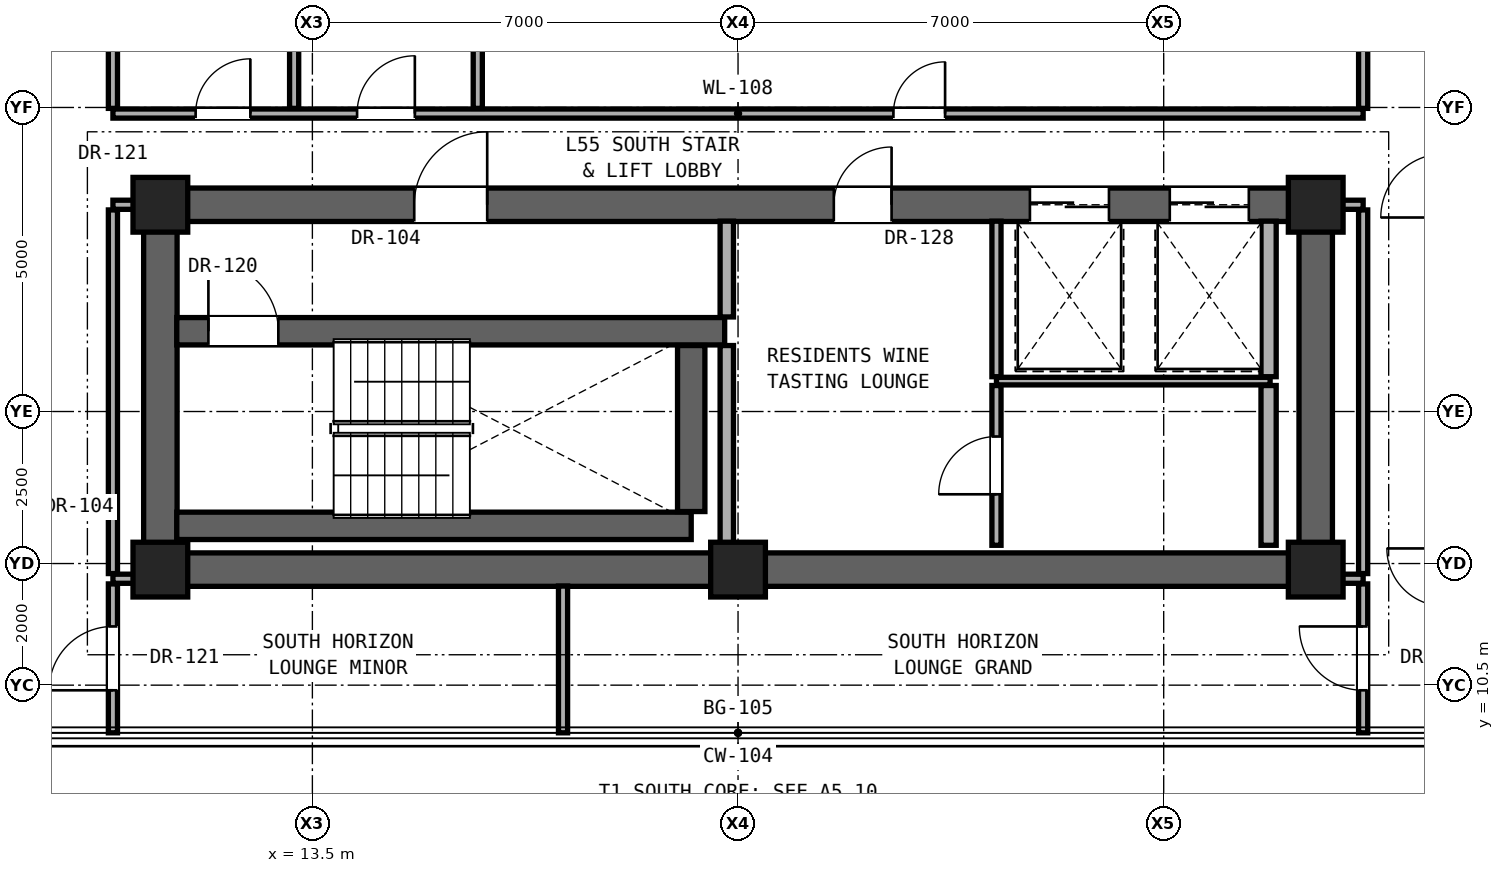
"""IFC4 building model, lengths in metres.
Left out: names, types, materials, properties, quantities, classifications, styles, units other than length and angle.
Written with IfcOpenShell. Run it as: python <this file> out.ifc"""

import sys

from ifc_helpers import new_model, si_unit, direction, frame, frame_2d, origin, origin_2d, place, context, subcontext, project, spatial, rectangle, extrude, element, fill, save


model = new_model("IFC4")
c1 = context("Model", 3, precision=1e-05, world=origin(), true_north=direction((0.0, 1.0)))
c2 = subcontext(c1, "Body", "Model", "MODEL_VIEW")
j1 = project(units=[si_unit("LENGTHUNIT", "METRE"), si_unit("PLANEANGLEUNIT", "RADIAN")], contexts=[c1])
p1 = place(None, origin())
s1 = spatial("IfcSite", under=j1, at=p1, CompositionType="ELEMENT")
p2 = place(p1, origin())
s2 = spatial("IfcBuilding", under=s1, at=p2, CompositionType="ELEMENT")
p3 = place(p2, frame((0.0, 0.0, 193.4)))
s3 = spatial("IfcBuildingStorey", under=s2, at=p3, CompositionType="ELEMENT", Elevation=193.4)
for number, where, z_axis, x_axis in (
    (1, (11.0, 12.4, 0.0), (0.0, 0.0, 1.0), (1.0, 0.0, 0.0)),
    (2, (20.5, 12.4, 0.0), (0.0, 0.0, 1.0), (1.0, 0.0, 0.0)),
    (3, (30.0, 12.4, 0.0), (0.0, 0.0, 1.0), (1.0, 0.0, 0.0)),
    (4, (11.0, 18.4, 0.0), (0.0, 0.0, 1.0), (1.0, 0.0, 0.0)),
    (5, (30.0, 18.4, 0.0), (0.0, 0.0, 1.0), (1.0, 0.0, 0.0)),
):
    element("IfcColumn", number, at=place(p3, frame(where, z_axis=z_axis, x_axis=x_axis)), inside=s3, PredefinedType="COLUMN", context=c2, shape_type="SweptSolid", body=[
        extrude(rectangle(XDim=0.9, YDim=0.9, at=origin_2d()), origin(), (0.0, 0.0, 1.0), 3.25),
    ])
p4 = place(p3, frame((11.0, 12.4, 0.0), z_axis=(0.0, 0.0, 1.0), x_axis=(1.0, 0.0, 0.0)))
e6 = element("IfcWall", 6, at=p4, inside=s3, PredefinedType="SHEAR", context=c2, shape_type="SweptSolid", body=[
    extrude(rectangle(XDim=19.0, YDim=0.55, at=frame_2d((9.5, 0.0))), origin(), (0.0, 0.0, 1.0), 3.05),
])
for number, where, z_axis, x_axis in (
    (7, (11.0, 12.4, 0.0), (0.0, 0.0, 1.0), (0.0, 1.0, 0.0)),
    (8, (30.0, 12.4, 0.0), (0.0, 0.0, 1.0), (0.0, 1.0, 0.0)),
):
    element("IfcWall", number, at=place(p3, frame(where, z_axis=z_axis, x_axis=x_axis)), inside=s3, PredefinedType="SHEAR", context=c2, shape_type="SweptSolid", body=[
        extrude(rectangle(XDim=6.0, YDim=0.55, at=frame_2d((3.0, 0.0))), origin(), (0.0, 0.0, 1.0), 3.05),
    ])
p5 = place(p3, frame((11.0, 18.4, 0.0), z_axis=(0.0, 0.0, 1.0), x_axis=(1.0, 0.0, 0.0)))
e9 = element("IfcWall", 9, at=p5, inside=s3, PredefinedType="SHEAR", context=c2, shape_type="SweptSolid", body=[
    extrude(rectangle(XDim=19.0, YDim=0.55, at=frame_2d((9.5, 0.0))), origin(), (0.0, 0.0, 1.0), 3.05),
])
p6 = place(p5, frame((4.175, 0.0, 0.0)))
e10 = element("IfcOpeningElement", 10, at=p6, cuts=e9, PredefinedType="OPENING", context=c2, shape_type="SweptSolid", body=[
    extrude(rectangle(XDim=1.2, YDim=2.25, at=frame_2d((0.6, 1.125))), frame((0.0, 0.285, 0.0), z_axis=(0.0, -1.0, 0.0), x_axis=(1.0, 0.0, 0.0)), (0.0, 0.0, 1.0), 0.57),
])
p7 = place(p5, frame((11.075, 0.0, 0.0)))
e11 = element("IfcOpeningElement", 11, at=p7, cuts=e9, PredefinedType="OPENING", context=c2, shape_type="SweptSolid", body=[
    extrude(rectangle(XDim=0.95, YDim=2.15, at=frame_2d((0.475, 1.075))), frame((0.0, 0.285, 0.0), z_axis=(0.0, -1.0, 0.0), x_axis=(1.0, 0.0, 0.0)), (0.0, 0.0, 1.0), 0.57),
])
p8 = place(p5, frame((14.3, 0.0, 0.0)))
e12 = element("IfcOpeningElement", 12, at=p8, cuts=e9, PredefinedType="OPENING", context=c2, shape_type="SweptSolid", body=[
    extrude(rectangle(XDim=1.3, YDim=2.3, at=frame_2d((0.65, 1.15))), frame((0.0, 0.285, 0.0), z_axis=(0.0, -1.0, 0.0), x_axis=(1.0, 0.0, 0.0)), (0.0, 0.0, 1.0), 0.57),
])
p9 = place(p5, frame((16.6, 0.0, 0.0)))
e13 = element("IfcOpeningElement", 13, at=p9, cuts=e9, PredefinedType="OPENING", context=c2, shape_type="SweptSolid", body=[
    extrude(rectangle(XDim=1.3, YDim=2.3, at=frame_2d((0.65, 1.15))), frame((0.0, 0.285, 0.0), z_axis=(0.0, -1.0, 0.0), x_axis=(1.0, 0.0, 0.0)), (0.0, 0.0, 1.0), 0.57),
])
for number, where, z_axis, x_axis in (
    (14, (10.22, 12.25, 0.0), (0.0, 0.0, 1.0), (1.0, 0.0, 0.0)),
    (15, (30.27, 12.25, 0.0), (0.0, 0.0, 1.0), (1.0, 0.0, 0.0)),
):
    element("IfcWall", number, at=place(p3, frame(where, z_axis=z_axis, x_axis=x_axis)), inside=s3, PredefinedType="PARTITIONING", context=c2, shape_type="SweptSolid", body=[
        extrude(rectangle(XDim=0.51, YDim=0.15, at=frame_2d((0.255, 0.0))), origin(), (0.0, 0.0, 1.0), 3.05),
    ])
p10 = place(p3, frame((11.27, 13.12, 0.0), z_axis=(0.0, 0.0, 1.0), x_axis=(1.0, 0.0, 0.0)))
e16 = element("IfcWall", 16, at=p10, inside=s3, PredefinedType="SHEAR", context=c2, shape_type="SweptSolid", body=[
    extrude(rectangle(XDim=8.46, YDim=0.45, at=frame_2d((4.23, 0.0))), origin(), (0.0, 0.0, 1.0), 3.05),
])
p11 = place(p3, frame((24.75, 15.5, 0.0), z_axis=(0.0, 0.0, 1.0), x_axis=(1.0, 0.0, 0.0)))
e17 = element("IfcWall", 17, at=p11, inside=s3, PredefinedType="PARTITIONING", context=c2, shape_type="SweptSolid", body=[
    extrude(rectangle(XDim=4.5, YDim=0.125, at=frame_2d((2.25, 0.0))), origin(), (0.0, 0.0, 1.0), 3.05),
])
p12 = place(p3, frame((11.27, 16.32, 0.0), z_axis=(0.0, 0.0, 1.0), x_axis=(1.0, 0.0, 0.0)))
e18 = element("IfcWall", 18, at=p12, inside=s3, PredefinedType="SHEAR", context=c2, shape_type="SweptSolid", body=[
    extrude(rectangle(XDim=9.01, YDim=0.45, at=frame_2d((4.505, 0.0))), origin(), (0.0, 0.0, 1.0), 3.05),
])
p13 = place(p12, frame((0.52, 0.0, 0.0)))
e19 = element("IfcOpeningElement", 19, at=p13, cuts=e18, PredefinedType="OPENING", context=c2, shape_type="SweptSolid", body=[
    extrude(rectangle(XDim=1.15, YDim=2.2, at=frame_2d((0.575, 1.1))), frame((0.0, 0.235, 0.0), z_axis=(0.0, -1.0, 0.0), x_axis=(1.0, 0.0, 0.0)), (0.0, 0.0, 1.0), 0.47),
])
for number, where, z_axis, x_axis in (
    (20, (10.22, 18.4, 0.0), (0.0, 0.0, 1.0), (1.0, 0.0, 0.0)),
    (21, (30.27, 18.4, 0.0), (0.0, 0.0, 1.0), (1.0, 0.0, 0.0)),
):
    element("IfcWall", number, at=place(p3, frame(where, z_axis=z_axis, x_axis=x_axis)), inside=s3, PredefinedType="PARTITIONING", context=c2, shape_type="SweptSolid", body=[
        extrude(rectangle(XDim=0.51, YDim=0.15, at=frame_2d((0.255, 0.0))), origin(), (0.0, 0.0, 1.0), 2.442),
    ])
p14 = place(p3, frame((10.22, 19.9, 0.0), z_axis=(0.0, 0.0, 1.0), x_axis=(1.0, 0.0, 0.0)))
e22 = element("IfcWall", 22, at=p14, inside=s3, PredefinedType="PARTITIONING", context=c2, shape_type="SweptSolid", body=[
    extrude(rectangle(XDim=20.56, YDim=0.15, at=frame_2d((10.28, 0.0))), origin(), (0.0, 0.0, 1.0), 2.186),
])
p15 = place(p14, frame((1.36, 0.0, 0.0)))
e23 = element("IfcOpeningElement", 23, at=p15, cuts=e22, PredefinedType="OPENING", context=c2, shape_type="SweptSolid", body=[
    extrude(rectangle(XDim=0.9, YDim=2.1, at=frame_2d((0.45, 1.05))), frame((0.0, 0.085, 0.0), z_axis=(0.0, -1.0, 0.0), x_axis=(1.0, 0.0, 0.0)), (0.0, 0.0, 1.0), 0.17),
])
p16 = place(p14, frame((4.015, 0.0, 0.0)))
e24 = element("IfcOpeningElement", 24, at=p16, cuts=e22, PredefinedType="OPENING", context=c2, shape_type="SweptSolid", body=[
    extrude(rectangle(XDim=0.95, YDim=2.15, at=frame_2d((0.475, 1.075))), frame((0.0, 0.085, 0.0), z_axis=(0.0, -1.0, 0.0), x_axis=(1.0, 0.0, 0.0)), (0.0, 0.0, 1.0), 0.17),
])
p17 = place(p14, frame((12.835, 0.0, 0.0)))
e25 = element("IfcOpeningElement", 25, at=p17, cuts=e22, PredefinedType="OPENING", context=c2, shape_type="SweptSolid", body=[
    extrude(rectangle(XDim=0.85, YDim=2.01, at=frame_2d((0.425, 1.005))), frame((0.0, 0.085, 0.0), z_axis=(0.0, -1.0, 0.0), x_axis=(1.0, 0.0, 0.0)), (0.0, 0.0, 1.0), 0.17),
])
p18 = place(p3, frame((10.22, 9.716, 0.0), z_axis=(0.0, 0.0, 1.0), x_axis=(0.0, 1.0, 0.0)))
e26 = element("IfcWall", 26, at=p18, inside=s3, PredefinedType="PARTITIONING", context=c2, shape_type="SweptSolid", body=[
    extrude(rectangle(XDim=2.449, YDim=0.15, at=frame_2d((1.225, 0.0))), origin(), (0.0, 0.0, 1.0), 3.05),
])
p19 = place(p18, frame((0.699, 0.0, 0.0)))
e27 = element("IfcOpeningElement", 27, at=p19, cuts=e26, PredefinedType="OPENING", context=c2, shape_type="SweptSolid", body=[
    extrude(rectangle(XDim=1.05, YDim=2.2, at=frame_2d((0.525, 1.1))), frame((0.0, 0.085, 0.0), z_axis=(0.0, -1.0, 0.0), x_axis=(1.0, 0.0, 0.0)), (0.0, 0.0, 1.0), 0.17),
])
p20 = place(p3, frame((10.22, 12.335, 0.0), z_axis=(0.0, 0.0, 1.0), x_axis=(0.0, 1.0, 0.0)))
e28 = element("IfcWall", 28, at=p20, inside=s3, PredefinedType="PARTITIONING", context=c2, shape_type="SweptSolid", body=[
    extrude(rectangle(XDim=5.98, YDim=0.15, at=frame_2d((2.99, 0.0))), origin(), (0.0, 0.0, 1.0), 2.442),
])
for number, where, z_axis, x_axis in (
    (29, (10.22, 19.985, 0.0), (0.0, 0.0, 1.0), (0.0, 1.0, 0.0)),
    (30, (13.2, 19.985, 0.0), (0.0, 0.0, 1.0), (0.0, 1.0, 0.0)),
    (31, (16.22, 19.985, 0.0), (0.0, 0.0, 1.0), (0.0, 1.0, 0.0)),
):
    element("IfcWall", number, at=place(p3, frame(where, z_axis=z_axis, x_axis=x_axis)), inside=s3, PredefinedType="PARTITIONING", context=c2, shape_type="SweptSolid", body=[
        extrude(rectangle(XDim=2.78, YDim=0.15, at=frame_2d((1.39, 0.0))), origin(), (0.0, 0.0, 1.0), 3.05),
    ])
p21 = place(p3, frame((17.622, 9.716, 0.0), z_axis=(0.0, 0.0, 1.0), x_axis=(0.0, 1.0, 0.0)))
e32 = element("IfcWall", 32, at=p21, inside=s3, PredefinedType="PARTITIONING", context=c2, shape_type="SweptSolid", body=[
    extrude(rectangle(XDim=2.414, YDim=0.15, at=frame_2d((1.207, 0.0))), origin(), (0.0, 0.0, 1.0), 3.05),
])
p22 = place(p3, frame((19.73, 13.355, 0.0), z_axis=(0.0, 0.0, 1.0), x_axis=(0.0, 1.0, 0.0)))
e33 = element("IfcWall", 33, at=p22, inside=s3, PredefinedType="SHEAR", context=c2, shape_type="SweptSolid", body=[
    extrude(rectangle(XDim=2.73, YDim=0.45, at=frame_2d((1.365, 0.0))), origin(), (0.0, 0.0, 1.0), 3.05),
])
p23 = place(p3, frame((20.315, 12.8, 0.0), z_axis=(0.0, 0.0, 1.0), x_axis=(0.0, 1.0, 0.0)))
e34 = element("IfcWall", 34, at=p23, inside=s3, PredefinedType="SOLIDWALL", context=c2, shape_type="SweptSolid", body=[
    extrude(rectangle(XDim=3.285, YDim=0.22, at=frame_2d((1.643, 0.0))), origin(), (0.0, 0.0, 1.0), 3.05),
])
p24 = place(p3, frame((20.315, 16.555, 0.0), z_axis=(0.0, 0.0, 1.0), x_axis=(0.0, 1.0, 0.0)))
e35 = element("IfcWall", 35, at=p24, inside=s3, PredefinedType="SOLIDWALL", context=c2, shape_type="SweptSolid", body=[
    extrude(rectangle(XDim=1.575, YDim=0.22, at=frame_2d((0.788, 0.0))), origin(), (0.0, 0.0, 1.0), 3.05),
])
p25 = place(p3, frame((24.75, 12.8, 0.0), z_axis=(0.0, 0.0, 1.0), x_axis=(0.0, 1.0, 0.0)))
e36 = element("IfcWall", 36, at=p25, inside=s3, PredefinedType="PARTITIONING", context=c2, shape_type="SweptSolid", body=[
    extrude(rectangle(XDim=2.627, YDim=0.15, at=frame_2d((1.314, 0.0))), origin(), (0.0, 0.0, 1.0), 3.05),
])
p26 = place(p25, frame((0.839, 0.0, 0.0)))
e37 = element("IfcOpeningElement", 37, at=p26, cuts=e36, PredefinedType="OPENING", context=c2, shape_type="SweptSolid", body=[
    extrude(rectangle(XDim=0.95, YDim=2.15, at=frame_2d((0.475, 1.075))), frame((0.0, 0.085, 0.0), z_axis=(0.0, -1.0, 0.0), x_axis=(1.0, 0.0, 0.0)), (0.0, 0.0, 1.0), 0.17),
])
p27 = place(p3, frame((24.75, 15.573, 0.0), z_axis=(0.0, 0.0, 1.0), x_axis=(0.0, 1.0, 0.0)))
e38 = element("IfcWall", 38, at=p27, inside=s3, PredefinedType="PARTITIONING", context=c2, shape_type="SweptSolid", body=[
    extrude(rectangle(XDim=2.557, YDim=0.15, at=frame_2d((1.279, 0.0))), origin(), (0.0, 0.0, 1.0), 3.05),
])
p28 = place(p3, frame((29.225, 12.8, 0.0), z_axis=(0.0, 0.0, 1.0), x_axis=(0.0, 1.0, 0.0)))
e39 = element("IfcWall", 39, at=p28, inside=s3, PredefinedType="SOLIDWALL", context=c2, shape_type="SweptSolid", body=[
    extrude(rectangle(XDim=2.627, YDim=0.25, at=frame_2d((1.314, 0.0))), origin(), (0.0, 0.0, 1.0), 3.05),
])
p29 = place(p3, frame((29.225, 15.573, 0.0), z_axis=(0.0, 0.0, 1.0), x_axis=(0.0, 1.0, 0.0)))
e40 = element("IfcWall", 40, at=p29, inside=s3, PredefinedType="SOLIDWALL", context=c2, shape_type="SweptSolid", body=[
    extrude(rectangle(XDim=2.557, YDim=0.25, at=frame_2d((1.279, 0.0))), origin(), (0.0, 0.0, 1.0), 3.05),
])
p30 = place(p3, frame((30.78, 9.716, 0.0), z_axis=(0.0, 0.0, 1.0), x_axis=(0.0, 1.0, 0.0)))
e41 = element("IfcWall", 41, at=p30, inside=s3, PredefinedType="PARTITIONING", context=c2, shape_type="SweptSolid", body=[
    extrude(rectangle(XDim=2.449, YDim=0.15, at=frame_2d((1.225, 0.0))), origin(), (0.0, 0.0, 1.0), 3.05),
])
p31 = place(p30, frame((0.699, 0.0, 0.0)))
e42 = element("IfcOpeningElement", 42, at=p31, cuts=e41, PredefinedType="OPENING", context=c2, shape_type="SweptSolid", body=[
    extrude(rectangle(XDim=1.05, YDim=2.2, at=frame_2d((0.525, 1.1))), frame((0.0, 0.085, 0.0), z_axis=(0.0, -1.0, 0.0), x_axis=(1.0, 0.0, 0.0)), (0.0, 0.0, 1.0), 0.17),
])
p32 = place(p3, frame((30.78, 12.335, 0.0), z_axis=(0.0, 0.0, 1.0), x_axis=(0.0, 1.0, 0.0)))
e43 = element("IfcWall", 43, at=p32, inside=s3, PredefinedType="PARTITIONING", context=c2, shape_type="SweptSolid", body=[
    extrude(rectangle(XDim=5.98, YDim=0.15, at=frame_2d((2.99, 0.0))), origin(), (0.0, 0.0, 1.0), 2.442),
])
p33 = place(p3, frame((30.78, 19.985, 0.0), z_axis=(0.0, 0.0, 1.0), x_axis=(0.0, 1.0, 0.0)))
e44 = element("IfcWall", 44, at=p33, inside=s3, PredefinedType="PARTITIONING", context=c2, shape_type="SweptSolid", body=[
    extrude(rectangle(XDim=7.486, YDim=0.15, at=frame_2d((3.743, 0.0))), origin(), (0.0, 0.0, 1.0), 2.346),
])
p34 = place(p6, origin())
e45 = element("IfcDoor", 45, at=p34, inside=s3, OperationType="SINGLE_SWING_RIGHT", PredefinedType="DOOR", context=c2, shape_type="SweptSolid", body=[
    extrude(rectangle(XDim=1.2, YDim=2.25, at=frame_2d((0.6, 1.125))), frame((0.0, 0.025, 0.0), z_axis=(0.0, -1.0, 0.0), x_axis=(1.0, 0.0, 0.0)), (0.0, 0.0, 1.0), 0.05),
])
fill(e10, e45)
p35 = place(p13, origin())
e46 = element("IfcDoor", 46, at=p35, inside=s3, OperationType="SINGLE_SWING_LEFT", PredefinedType="DOOR", context=c2, shape_type="SweptSolid", body=[
    extrude(rectangle(XDim=1.15, YDim=2.2, at=frame_2d((0.575, 1.1))), frame((0.0, 0.025, 0.0), z_axis=(0.0, -1.0, 0.0), x_axis=(1.0, 0.0, 0.0)), (0.0, 0.0, 1.0), 0.05),
])
fill(e19, e46)
p36 = place(p7, origin())
e47 = element("IfcDoor", 47, at=p36, inside=s3, OperationType="SINGLE_SWING_RIGHT", PredefinedType="DOOR", context=c2, shape_type="SweptSolid", body=[
    extrude(rectangle(XDim=0.95, YDim=2.15, at=frame_2d((0.475, 1.075))), frame((0.0, 0.025, 0.0), z_axis=(0.0, -1.0, 0.0), x_axis=(1.0, 0.0, 0.0)), (0.0, 0.0, 1.0), 0.05),
])
fill(e11, e47)
p37 = place(p26, origin())
e48 = element("IfcDoor", 48, at=p37, inside=s3, OperationType="SINGLE_SWING_LEFT", PredefinedType="DOOR", context=c2, shape_type="SweptSolid", body=[
    extrude(rectangle(XDim=0.95, YDim=2.15, at=frame_2d((0.475, 1.075))), frame((0.0, 0.025, 0.0), z_axis=(0.0, -1.0, 0.0), x_axis=(1.0, 0.0, 0.0)), (0.0, 0.0, 1.0), 0.05),
])
fill(e37, e48)
p38 = place(p15, origin())
e49 = element("IfcDoor", 49, at=p38, inside=s3, OperationType="SINGLE_SWING_RIGHT", PredefinedType="DOOR", context=c2, shape_type="SweptSolid", body=[
    extrude(rectangle(XDim=0.9, YDim=2.1, at=frame_2d((0.45, 1.05))), frame((0.0, 0.025, 0.0), z_axis=(0.0, -1.0, 0.0), x_axis=(1.0, 0.0, 0.0)), (0.0, 0.0, 1.0), 0.05),
])
fill(e23, e49)
p39 = place(p16, origin())
e50 = element("IfcDoor", 50, at=p39, inside=s3, OperationType="SINGLE_SWING_RIGHT", PredefinedType="DOOR", context=c2, shape_type="SweptSolid", body=[
    extrude(rectangle(XDim=0.95, YDim=2.15, at=frame_2d((0.475, 1.075))), frame((0.0, 0.025, 0.0), z_axis=(0.0, -1.0, 0.0), x_axis=(1.0, 0.0, 0.0)), (0.0, 0.0, 1.0), 0.05),
])
fill(e24, e50)
p40 = place(p17, origin())
e51 = element("IfcDoor", 51, at=p40, inside=s3, OperationType="SINGLE_SWING_RIGHT", PredefinedType="DOOR", context=c2, shape_type="SweptSolid", body=[
    extrude(rectangle(XDim=0.85, YDim=2.01, at=frame_2d((0.425, 1.005))), frame((0.0, 0.025, 0.0), z_axis=(0.0, -1.0, 0.0), x_axis=(1.0, 0.0, 0.0)), (0.0, 0.0, 1.0), 0.05),
])
fill(e25, e51)
p41 = place(p19, origin())
e52 = element("IfcDoor", 52, at=p41, inside=s3, OperationType="SINGLE_SWING_LEFT", PredefinedType="DOOR", context=c2, shape_type="SweptSolid", body=[
    extrude(rectangle(XDim=1.05, YDim=2.2, at=frame_2d((0.525, 1.1))), frame((0.0, 0.025, 0.0), z_axis=(0.0, -1.0, 0.0), x_axis=(1.0, 0.0, 0.0)), (0.0, 0.0, 1.0), 0.05),
])
fill(e27, e52)
p42 = place(p31, origin())
e53 = element("IfcDoor", 53, at=p42, inside=s3, OperationType="SINGLE_SWING_RIGHT", PredefinedType="DOOR", context=c2, shape_type="SweptSolid", body=[
    extrude(rectangle(XDim=1.05, YDim=2.2, at=frame_2d((0.525, 1.1))), frame((0.0, 0.025, 0.0), z_axis=(0.0, -1.0, 0.0), x_axis=(1.0, 0.0, 0.0)), (0.0, 0.0, 1.0), 0.05),
])
fill(e42, e53)
p43 = place(p8, origin())
e54 = element("IfcDoor", 54, at=p43, inside=s3, OperationType="DOUBLE_DOOR_SLIDING", PredefinedType="DOOR", context=c2, shape_type="SweptSolid", body=[
    extrude(rectangle(XDim=1.3, YDim=2.3, at=frame_2d((0.65, 1.15))), frame((0.0, 0.025, 0.0), z_axis=(0.0, -1.0, 0.0), x_axis=(1.0, 0.0, 0.0)), (0.0, 0.0, 1.0), 0.05),
])
fill(e12, e54)
p44 = place(p9, origin())
e55 = element("IfcDoor", 55, at=p44, inside=s3, OperationType="DOUBLE_DOOR_SLIDING", PredefinedType="DOOR", context=c2, shape_type="SweptSolid", body=[
    extrude(rectangle(XDim=1.3, YDim=2.3, at=frame_2d((0.65, 1.15))), frame((0.0, 0.025, 0.0), z_axis=(0.0, -1.0, 0.0), x_axis=(1.0, 0.0, 0.0)), (0.0, 0.0, 1.0), 0.05),
])
fill(e13, e55)
save(model, sys.argv[1])
